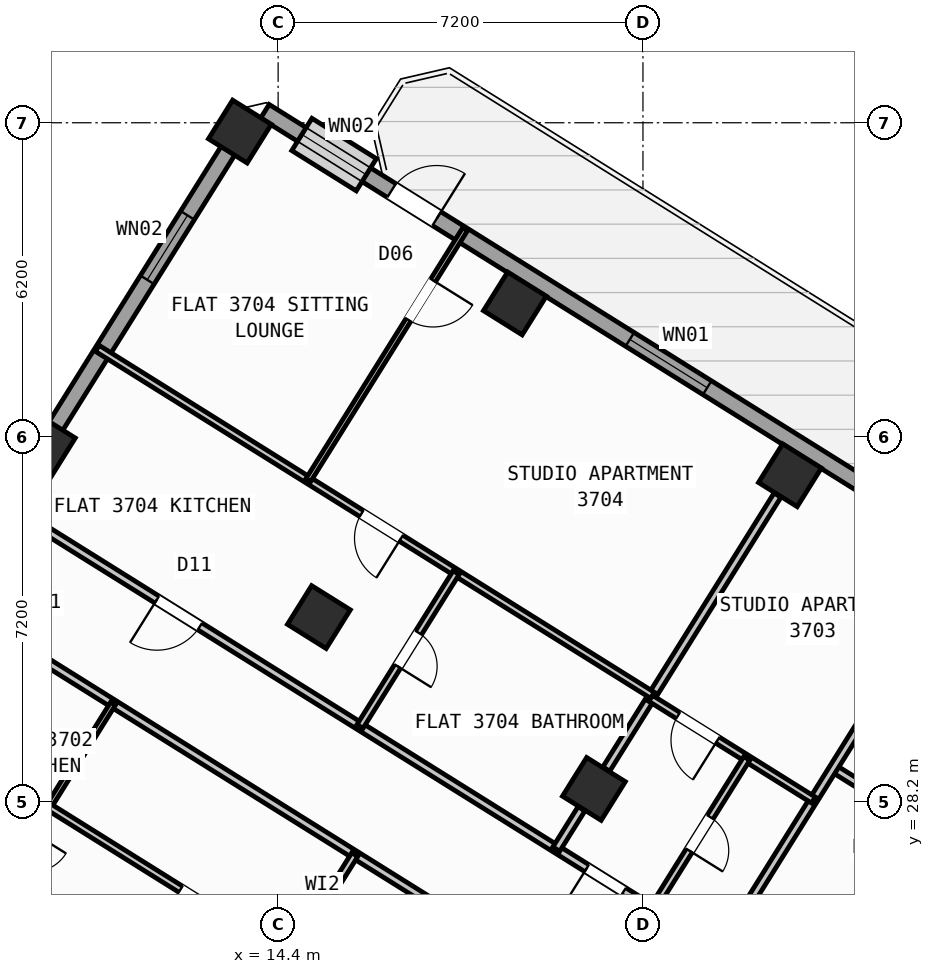
"""IFC4 building model, lengths in metres.
Left out: names, types, materials, properties, quantities, classifications, styles, units other than length and angle.
Written with IfcOpenShell. Run it as: python <this file> out.ifc"""

import sys

from ifc_helpers import new_model, si_unit, direction, frame, frame_2d, origin, origin_2d, place, context, subcontext, project, spatial, rectangle, hollow_rectangle, extrude, source, transform, mapped, element, fill, save


model = new_model("IFC4")
c1 = context("Model", 3, precision=1e-05, world=origin(), true_north=direction((0.0, 1.0)))
c2 = subcontext(c1, "Body", "Model", "MODEL_VIEW")
j1 = project(units=[si_unit("LENGTHUNIT", "METRE"), si_unit("PLANEANGLEUNIT", "RADIAN")], contexts=[c1])
p1 = place(None, origin())
s1 = spatial("IfcSite", under=j1, at=p1, CompositionType="ELEMENT")
p2 = place(p1, origin())
s2 = spatial("IfcBuilding", under=s1, at=p2, CompositionType="ELEMENT")
p3 = place(p2, frame((0.0, 0.0, 147.9)))
s3 = spatial("IfcBuildingStorey", under=s2, at=p3, CompositionType="ELEMENT", Elevation=147.9)
m1 = source(origin(), c2, "Body", "SweptSolid", [
    extrude(hollow_rectangle(XDim=0.9, YDim=0.9, WallThickness=0.036, at=origin_2d()), origin(), (0.0, 0.0, 1.0), 3.6),
])
for number, where, z_axis, x_axis in (
    (1, (24.5, 34.643, 0.0), (0.0, 0.0, 1.0), (-0.848, 0.53, 0.0)),
    (2, (20.632, 28.452, 0.0), (0.0, 0.0, 1.0), (-0.848, 0.53, 0.0)),
    (3, (19.073, 38.034, 0.0), (0.0, 0.0, 1.0), (-0.848, 0.53, 0.0)),
    (4, (15.205, 31.844, 0.0), (0.0, 0.0, 1.0), (-0.848, 0.53, 0.0)),
    (5, (13.646, 41.426, 0.0), (0.0, 0.0, 1.0), (-0.848, 0.53, 0.0)),
    (6, (9.777, 35.235, 0.0), (0.0, 0.0, 1.0), (-0.848, 0.53, 0.0)),
):
    element("IfcColumn", number, at=place(p3, frame(where, z_axis=z_axis, x_axis=x_axis)), inside=s3, PredefinedType="COLUMN", context=c2, shape_type="MappedRepresentation", body=[
        mapped(m1, transform((0.0, 0.0, 0.0), scale=1.0)),
    ])
p4 = place(p3, frame((2.415, 23.452, 0.0), z_axis=(0.0, 0.0, 1.0), x_axis=(0.52991049553, 0.848053575387, 0.0)))
e7 = element("IfcWall", 7, at=p4, inside=s3, PredefinedType="STANDARD", context=c2, shape_type="SweptSolid", body=[
    extrude(rectangle(XDim=21.587, YDim=0.32, at=frame_2d((10.794, 0.0))), origin(), (0.0, 0.0, 1.0), 2.775),
])
p5 = place(p4, frame((2.356, 0.0, 0.8)))
e8 = element("IfcOpeningElement", 8, at=p5, cuts=e7, PredefinedType="OPENING", context=c2, shape_type="SweptSolid", body=[
    extrude(rectangle(XDim=2.1, YDim=1.55, at=frame_2d((1.05, 0.775))), frame((0.0, 0.17, 0.0), z_axis=(0.0, -1.0, 0.0), x_axis=(1.0, 0.0, 0.0)), (0.0, 0.0, 1.0), 0.34),
])
p6 = place(p4, frame((8.639, 0.0, 1.0)))
e9 = element("IfcOpeningElement", 9, at=p6, cuts=e7, PredefinedType="OPENING", context=c2, shape_type="SweptSolid", body=[
    extrude(rectangle(XDim=0.9, YDim=1.25, at=frame_2d((0.45, 0.625))), frame((0.0, 0.17, 0.0), z_axis=(0.0, -1.0, 0.0), x_axis=(1.0, 0.0, 0.0)), (0.0, 0.0, 1.0), 0.34),
])
p7 = place(p4, frame((17.744, 0.0, 0.85)))
e10 = element("IfcOpeningElement", 10, at=p7, cuts=e7, PredefinedType="OPENING", context=c2, shape_type="SweptSolid", body=[
    extrude(rectangle(XDim=1.5, YDim=1.5, at=frame_2d((0.75, 0.75))), frame((0.0, 0.17, 0.0), z_axis=(0.0, -1.0, 0.0), x_axis=(1.0, 0.0, 0.0)), (0.0, 0.0, 1.0), 0.34),
])
p8 = place(p3, frame((14.138, 41.825, 0.0), z_axis=(0.0, 0.0, 1.0), x_axis=(0.848046498049, -0.529921821731, 0.0)))
e11 = element("IfcWall", 11, at=p8, inside=s3, PredefinedType="STANDARD", context=c2, shape_type="SweptSolid", body=[
    extrude(rectangle(XDim=31.588, YDim=0.32, at=frame_2d((15.794, 0.0))), origin(), (0.0, 0.0, 1.0), 3.35),
])
p9 = place(p8, frame((2.949, 0.0, 0.0)))
e12 = element("IfcOpeningElement", 12, at=p9, cuts=e11, PredefinedType="OPENING", context=c2, shape_type="SweptSolid", body=[
    extrude(rectangle(XDim=1.05, YDim=2.15, at=frame_2d((0.525, 1.075))), frame((0.0, 0.17, 0.0), z_axis=(0.0, -1.0, 0.0), x_axis=(1.0, 0.0, 0.0)), (0.0, 0.0, 1.0), 0.34),
])
p10 = place(p8, frame((0.861, 0.0, 0.85)))
e13 = element("IfcOpeningElement", 13, at=p10, cuts=e11, PredefinedType="OPENING", context=c2, shape_type="SweptSolid", body=[
    extrude(rectangle(XDim=1.5, YDim=1.5, at=frame_2d((0.75, 0.75))), frame((0.0, 0.17, 0.0), z_axis=(0.0, -1.0, 0.0), x_axis=(1.0, 0.0, 0.0)), (0.0, 0.0, 1.0), 0.34),
])
p11 = place(p8, frame((8.494, 0.0, 0.85)))
e14 = element("IfcOpeningElement", 14, at=p11, cuts=e11, PredefinedType="OPENING", context=c2, shape_type="SweptSolid", body=[
    extrude(rectangle(XDim=1.8, YDim=1.5, at=frame_2d((0.9, 0.75))), frame((0.0, 0.17, 0.0), z_axis=(0.0, -1.0, 0.0), x_axis=(1.0, 0.0, 0.0)), (0.0, 0.0, 1.0), 0.34),
])
p12 = place(p8, frame((13.874, 0.0, 0.85)))
e15 = element("IfcOpeningElement", 15, at=p12, cuts=e11, PredefinedType="OPENING", context=c2, shape_type="SweptSolid", body=[
    extrude(rectangle(XDim=1.5, YDim=1.5, at=frame_2d((0.75, 0.75))), frame((0.0, 0.17, 0.0), z_axis=(0.0, -1.0, 0.0), x_axis=(1.0, 0.0, 0.0)), (0.0, 0.0, 1.0), 0.34),
])
p13 = place(p8, frame((17.104, 0.0, 1.0)))
e16 = element("IfcOpeningElement", 16, at=p13, cuts=e11, PredefinedType="OPENING", context=c2, shape_type="SweptSolid", body=[
    extrude(rectangle(XDim=0.9, YDim=1.25, at=frame_2d((0.45, 0.625))), frame((0.0, 0.17, 0.0), z_axis=(0.0, -1.0, 0.0), x_axis=(1.0, 0.0, 0.0)), (0.0, 0.0, 1.0), 0.34),
])
p14 = place(p8, frame((22.144, 0.0, 1.0)))
e17 = element("IfcOpeningElement", 17, at=p14, cuts=e11, PredefinedType="OPENING", context=c2, shape_type="SweptSolid", body=[
    extrude(rectangle(XDim=0.9, YDim=1.25, at=frame_2d((0.45, 0.625))), frame((0.0, 0.17, 0.0), z_axis=(0.0, -1.0, 0.0), x_axis=(1.0, 0.0, 0.0)), (0.0, 0.0, 1.0), 0.34),
])
p15 = place(p8, frame((27.744, 0.0, 1.0)))
e18 = element("IfcOpeningElement", 18, at=p15, cuts=e11, PredefinedType="OPENING", context=c2, shape_type="SweptSolid", body=[
    extrude(rectangle(XDim=0.9, YDim=1.25, at=frame_2d((0.45, 0.625))), frame((0.0, 0.17, 0.0), z_axis=(0.0, -1.0, 0.0), x_axis=(1.0, 0.0, 0.0)), (0.0, 0.0, 1.0), 0.34),
])
p16 = place(p3, frame((27.57, 27.478, 0.0), z_axis=(0.0, 0.0, 1.0), x_axis=(-0.848050851465, 0.529914854792, 0.0)))
e19 = element("IfcWall", 19, at=p16, inside=s3, PredefinedType="PARTITIONING", context=c2, shape_type="SweptSolid", body=[
    extrude(rectangle(XDim=2.61, YDim=0.16, at=frame_2d((1.305, 0.0))), origin(), (0.0, 0.0, 1.0), 3.34),
])
p17 = place(p16, frame((0.95, 0.0, 0.0)))
e20 = element("IfcOpeningElement", 20, at=p17, cuts=e19, PredefinedType="OPENING", context=c2, shape_type="SweptSolid", body=[
    extrude(rectangle(XDim=0.86, YDim=2.05, at=frame_2d((0.43, 1.025))), frame((0.0, 0.09, 0.0), z_axis=(0.0, -1.0, 0.0), x_axis=(1.0, 0.0, 0.0)), (0.0, 0.0, 1.0), 0.18),
])
p18 = place(p3, frame((27.953, 33.016, 0.0), z_axis=(0.0, 0.0, 1.0), x_axis=(-0.529903001606, -0.848058257957, 0.0)))
e21 = element("IfcWall", 21, at=p18, inside=s3, PredefinedType="PARTITIONING", context=c2, shape_type="SweptSolid", body=[
    extrude(rectangle(XDim=9.15, YDim=0.16, at=frame_2d((4.575, 0.0))), origin(), (0.0, 0.0, 1.0), 3.34),
])
p19 = place(p3, frame((23.104, 25.256, 0.0), z_axis=(0.0, 0.0, 1.0), x_axis=(-0.848041752158, 0.529929416617, 0.0)))
e22 = element("IfcWall", 22, at=p19, inside=s3, PredefinedType="PARTITIONING", context=c2, shape_type="SweptSolid", body=[
    extrude(rectangle(XDim=16.73, YDim=0.16, at=frame_2d((8.365, 0.0))), origin(), (0.0, 0.0, 1.0), 3.34),
])
p20 = place(p19, frame((2.22, 0.0, 0.0)))
e23 = element("IfcOpeningElement", 23, at=p20, cuts=e22, PredefinedType="OPENING", context=c2, shape_type="SweptSolid", body=[
    extrude(rectangle(XDim=0.86, YDim=2.05, at=frame_2d((0.43, 1.025))), frame((0.0, 0.09, 0.0), z_axis=(0.0, -1.0, 0.0), x_axis=(1.0, 0.0, 0.0)), (0.0, 0.0, 1.0), 0.18),
])
p21 = place(p19, frame((12.084, 0.0, 0.0)))
e24 = element("IfcOpeningElement", 24, at=p21, cuts=e22, PredefinedType="OPENING", context=c2, shape_type="SweptSolid", body=[
    extrude(rectangle(XDim=1.0, YDim=2.1, at=frame_2d((0.5, 1.05))), frame((0.0, 0.09, 0.0), z_axis=(0.0, -1.0, 0.0), x_axis=(1.0, 0.0, 0.0)), (0.0, 0.0, 1.0), 0.18),
])
p22 = place(p3, frame((21.938, 23.391, 0.0), z_axis=(0.0, 0.0, 1.0), x_axis=(-0.848045850158, 0.529922858565, 0.0)))
e25 = element("IfcWall", 25, at=p22, inside=s3, PredefinedType="PARTITIONING", context=c2, shape_type="SweptSolid", body=[
    extrude(rectangle(XDim=16.73, YDim=0.16, at=frame_2d((8.365, 0.0))), origin(), (0.0, 0.0, 1.0), 3.34),
])
p23 = place(p22, frame((2.22, 0.0, 0.0)))
e26 = element("IfcOpeningElement", 26, at=p23, cuts=e25, PredefinedType="OPENING", context=c2, shape_type="SweptSolid", body=[
    extrude(rectangle(XDim=0.86, YDim=2.05, at=frame_2d((0.43, 1.025))), frame((0.0, 0.09, 0.0), z_axis=(0.0, -1.0, 0.0), x_axis=(1.0, 0.0, 0.0)), (0.0, 0.0, 1.0), 0.18),
])
p24 = place(p22, frame((14.22, 0.0, 0.0)))
e27 = element("IfcOpeningElement", 27, at=p24, cuts=e25, PredefinedType="OPENING", context=c2, shape_type="SweptSolid", body=[
    extrude(rectangle(XDim=1.0, YDim=2.1, at=frame_2d((0.5, 1.05))), frame((0.0, 0.09, 0.0), z_axis=(0.0, -1.0, 0.0), x_axis=(1.0, 0.0, 0.0)), (0.0, 0.0, 1.0), 0.18),
])
p25 = place(p3, frame((11.143, 30.136, 0.0), z_axis=(0.0, 0.0, 1.0), x_axis=(-0.529922479612, -0.848046086956, 0.0)))
e28 = element("IfcWall", 28, at=p25, inside=s3, PredefinedType="PARTITIONING", context=c2, shape_type="SweptSolid", body=[
    extrude(rectangle(XDim=10.62, YDim=0.11, at=frame_2d((5.31, 0.0))), origin(), (0.0, 0.0, 1.0), 3.34),
])
p26 = place(p25, frame((3.0, 0.0, 0.0)))
e29 = element("IfcOpeningElement", 29, at=p26, cuts=e28, PredefinedType="OPENING", context=c2, shape_type="SweptSolid", body=[
    extrude(rectangle(XDim=0.78, YDim=2.05, at=frame_2d((0.39, 1.025))), frame((0.0, 0.065, 0.0), z_axis=(0.0, -1.0, 0.0), x_axis=(1.0, 0.0, 0.0)), (0.0, 0.0, 1.0), 0.13),
])
p27 = place(p3, frame((17.452, 23.364, 0.0), z_axis=(0.0, 0.0, 1.0), x_axis=(-0.848044326704, 0.52992529657, 0.0)))
e30 = element("IfcWall", 30, at=p27, inside=s3, PredefinedType="PLUMBINGWALL", context=c2, shape_type="SweptSolid", body=[
    extrude(rectangle(XDim=8.94, YDim=0.14, at=frame_2d((4.47, 0.0))), origin(), (0.0, 0.0, 1.0), 3.34),
])
p28 = place(p27, frame((5.087, 0.0, 0.0)))
e31 = element("IfcOpeningElement", 31, at=p28, cuts=e30, PredefinedType="OPENING", context=c2, shape_type="SweptSolid", body=[
    extrude(rectangle(XDim=0.78, YDim=2.05, at=frame_2d((0.39, 1.025))), frame((0.0, 0.08, 0.0), z_axis=(0.0, -1.0, 0.0), x_axis=(1.0, 0.0, 0.0)), (0.0, 0.0, 1.0), 0.16),
])
p29 = place(p27, frame((1.218, 0.0, 0.0)))
e32 = element("IfcOpeningElement", 32, at=p29, cuts=e30, PredefinedType="OPENING", context=c2, shape_type="SweptSolid", body=[
    extrude(rectangle(XDim=0.78, YDim=2.05, at=frame_2d((0.39, 1.025))), frame((0.0, 0.08, 0.0), z_axis=(0.0, -1.0, 0.0), x_axis=(1.0, 0.0, 0.0)), (0.0, 0.0, 1.0), 0.16),
])
p30 = place(p3, frame((15.913, 27.156, 0.0), z_axis=(0.0, 0.0, 1.0), x_axis=(-0.529935194983, -0.848038141311, 0.0)))
e33 = element("IfcWall", 33, at=p30, inside=s3, PredefinedType="PLUMBINGWALL", context=c2, shape_type="SweptSolid", body=[
    extrude(rectangle(XDim=2.41, YDim=0.14, at=frame_2d((1.205, 0.0))), origin(), (0.0, 0.0, 1.0), 3.34),
])
p31 = place(p3, frame((16.403, 21.685, 0.0), z_axis=(0.0, 0.0, 1.0), x_axis=(-0.848044326704, 0.52992529657, 0.0)))
e34 = element("IfcWall", 34, at=p31, inside=s3, PredefinedType="PARTITIONING", context=c2, shape_type="SweptSolid", body=[
    extrude(rectangle(XDim=8.94, YDim=0.11, at=frame_2d((4.47, 0.0))), origin(), (0.0, 0.0, 1.0), 3.34),
])
p32 = place(p31, frame((0.657, 0.0, 0.0)))
e35 = element("IfcOpeningElement", 35, at=p32, cuts=e34, PredefinedType="OPENING", context=c2, shape_type="SweptSolid", body=[
    extrude(rectangle(XDim=0.92, YDim=2.08, at=frame_2d((0.46, 1.04))), frame((0.0, 0.065, 0.0), z_axis=(0.0, -1.0, 0.0), x_axis=(1.0, 0.0, 0.0)), (0.0, 0.0, 1.0), 0.13),
])
p33 = place(p31, frame((2.893, 0.0, 0.0)))
e36 = element("IfcOpeningElement", 36, at=p33, cuts=e34, PredefinedType="OPENING", context=c2, shape_type="SweptSolid", body=[
    extrude(rectangle(XDim=0.92, YDim=2.08, at=frame_2d((0.46, 1.04))), frame((0.0, 0.065, 0.0), z_axis=(0.0, -1.0, 0.0), x_axis=(1.0, 0.0, 0.0)), (0.0, 0.0, 1.0), 0.13),
])
p34 = place(p31, frame((5.008, 0.0, 0.0)))
e37 = element("IfcOpeningElement", 37, at=p34, cuts=e34, PredefinedType="OPENING", context=c2, shape_type="SweptSolid", body=[
    extrude(rectangle(XDim=0.92, YDim=2.08, at=frame_2d((0.46, 1.04))), frame((0.0, 0.065, 0.0), z_axis=(0.0, -1.0, 0.0), x_axis=(1.0, 0.0, 0.0)), (0.0, 0.0, 1.0), 0.13),
])
p35 = place(p31, frame((7.363, 0.0, 0.0)))
e38 = element("IfcOpeningElement", 38, at=p35, cuts=e34, PredefinedType="OPENING", context=c2, shape_type="SweptSolid", body=[
    extrude(rectangle(XDim=0.92, YDim=2.08, at=frame_2d((0.46, 1.04))), frame((0.0, 0.065, 0.0), z_axis=(0.0, -1.0, 0.0), x_axis=(1.0, 0.0, 0.0)), (0.0, 0.0, 1.0), 0.13),
])
p36 = place(p3, frame((24.256, 34.251, 0.0), z_axis=(0.0, 0.0, 1.0), x_axis=(-0.529919772691, -0.848047778437, 0.0)))
e39 = element("IfcWall", 39, at=p36, inside=s3, PredefinedType="PARTITIONING", context=c2, shape_type="SweptSolid", body=[
    extrude(rectangle(XDim=6.376, YDim=0.16, at=frame_2d((3.188, 0.0))), origin(), (0.0, 0.0, 1.0), 2.775),
])
p37 = place(p3, frame((20.387, 28.06, 0.0), z_axis=(0.0, 0.0, 1.0), x_axis=(-0.529952145338, -0.848027548876, 0.0)))
e40 = element("IfcWall", 40, at=p37, inside=s3, PredefinedType="PARTITIONING", context=c2, shape_type="SweptSolid", body=[
    extrude(rectangle(XDim=0.938, YDim=0.16, at=frame_2d((0.469, 0.0))), origin(), (0.0, 0.0, 1.0), 2.775),
])
p38 = place(p3, frame((24.964, 28.233, 0.0), z_axis=(0.0, 0.0, 1.0), x_axis=(-0.848059820872, 0.529900500304, 0.0)))
e41 = element("IfcWall", 41, at=p38, inside=s3, PredefinedType="PLUMBINGWALL", context=c2, shape_type="SweptSolid", body=[
    extrude(rectangle(XDim=3.79, YDim=0.14, at=frame_2d((1.895, 0.0))), origin(), (0.0, 0.0, 1.0), 3.34),
])
p39 = place(p38, frame((2.23, 0.0, 0.0)))
e42 = element("IfcOpeningElement", 42, at=p39, cuts=e41, PredefinedType="OPENING", context=c2, shape_type="SweptSolid", body=[
    extrude(rectangle(XDim=0.92, YDim=2.08, at=frame_2d((0.46, 1.04))), frame((0.0, 0.08, 0.0), z_axis=(0.0, -1.0, 0.0), x_axis=(1.0, 0.0, 0.0)), (0.0, 0.0, 1.0), 0.16),
])
p40 = place(p3, frame((23.65, 29.054, 0.0), z_axis=(0.0, 0.0, 1.0), x_axis=(-0.529898896701, -0.848060822863, 0.0)))
e43 = element("IfcWall", 43, at=p40, inside=s3, PredefinedType="PLUMBINGWALL", context=c2, shape_type="SweptSolid", body=[
    extrude(rectangle(XDim=3.51, YDim=0.14, at=frame_2d((1.755, 0.0))), origin(), (0.0, 0.0, 1.0), 2.995),
])
p41 = place(p40, frame((1.365, 0.0, 0.0)))
e44 = element("IfcOpeningElement", 44, at=p41, cuts=e43, PredefinedType="OPENING", context=c2, shape_type="SweptSolid", body=[
    extrude(rectangle(XDim=0.78, YDim=2.05, at=frame_2d((0.39, 1.025))), frame((0.0, 0.08, 0.0), z_axis=(0.0, -1.0, 0.0), x_axis=(1.0, 0.0, 0.0)), (0.0, 0.0, 1.0), 0.16),
])
p42 = place(p3, frame((21.787, 30.301, 0.0), z_axis=(0.0, 0.0, 1.0), x_axis=(-0.848043949058, 0.52992590092, 0.0)))
e45 = element("IfcWall", 45, at=p42, inside=s3, PredefinedType="PLUMBINGWALL", context=c2, shape_type="SweptSolid", body=[
    extrude(rectangle(XDim=12.92, YDim=0.14, at=frame_2d((6.46, 0.0))), origin(), (0.0, 0.0, 1.0), 3.34),
])
p43 = place(p42, frame((5.849, 0.0, 0.0)))
e46 = element("IfcOpeningElement", 46, at=p43, cuts=e45, PredefinedType="OPENING", context=c2, shape_type="SweptSolid", body=[
    extrude(rectangle(XDim=0.92, YDim=2.08, at=frame_2d((0.46, 1.04))), frame((0.0, 0.08, 0.0), z_axis=(0.0, -1.0, 0.0), x_axis=(1.0, 0.0, 0.0)), (0.0, 0.0, 1.0), 0.16),
])
p44 = place(p3, frame((17.913, 32.721, 0.0), z_axis=(0.0, 0.0, 1.0), x_axis=(-0.529906983049, -0.848055770169, 0.0)))
e47 = element("IfcWall", 47, at=p44, inside=s3, PredefinedType="PLUMBINGWALL", context=c2, shape_type="SweptSolid", body=[
    extrude(rectangle(XDim=3.58, YDim=0.14, at=frame_2d((1.79, 0.0))), origin(), (0.0, 0.0, 1.0), 3.34),
])
p45 = place(p44, frame((1.4, 0.0, 0.0)))
e48 = element("IfcOpeningElement", 48, at=p45, cuts=e47, PredefinedType="OPENING", context=c2, shape_type="SweptSolid", body=[
    extrude(rectangle(XDim=0.78, YDim=2.05, at=frame_2d((0.39, 1.025))), frame((0.0, 0.08, 0.0), z_axis=(0.0, -1.0, 0.0), x_axis=(1.0, 0.0, 0.0)), (0.0, 0.0, 1.0), 0.16),
])
p46 = place(p3, frame((18.089, 39.498, 0.0), z_axis=(0.0, 0.0, 1.0), x_axis=(-0.529916267533, -0.848049968695, 0.0)))
e49 = element("IfcWall", 49, at=p46, inside=s3, PredefinedType="PARTITIONING", context=c2, shape_type="SweptSolid", body=[
    extrude(rectangle(XDim=5.84, YDim=0.11, at=frame_2d((2.92, 0.0))), origin(), (0.0, 0.0, 1.0), 3.34),
])
p47 = place(p46, frame((1.19, 0.0, 0.0)))
e50 = element("IfcOpeningElement", 50, at=p47, cuts=e49, PredefinedType="OPENING", context=c2, shape_type="SweptSolid", body=[
    extrude(rectangle(XDim=0.92, YDim=2.08, at=frame_2d((0.46, 1.04))), frame((0.0, 0.065, 0.0), z_axis=(0.0, -1.0, 0.0), x_axis=(1.0, 0.0, 0.0)), (0.0, 0.0, 1.0), 0.13),
])
m2 = source(origin(), c2, "Body", "SweptSolid", [
    extrude(rectangle(XDim=1.05, YDim=2.15, at=frame_2d((0.525, 1.075))), frame((0.0, 0.025, 0.0), z_axis=(0.0, -1.0, 0.0), x_axis=(1.0, 0.0, 0.0)), (0.0, 0.0, 1.0), 0.05),
])
p48 = place(p9, origin())
e51 = element("IfcDoor", 51, at=p48, inside=s3, OperationType="SINGLE_SWING_RIGHT", PredefinedType="DOOR", context=c2, shape_type="MappedRepresentation", body=[
    mapped(m2, transform((0.0, 0.0, 0.0), scale=1.0)),
])
fill(e12, e51)
m3 = source(origin(), c2, "Body", "SweptSolid", [
    extrude(rectangle(XDim=1.5, YDim=1.5, at=frame_2d((0.75, 0.75))), frame((0.0, 0.03, 0.0), z_axis=(0.0, -1.0, 0.0), x_axis=(1.0, 0.0, 0.0)), (0.0, 0.0, 1.0), 0.06),
])
p49 = place(p7, origin())
e52 = element("IfcWindow", 52, at=p49, inside=s3, PartitioningType="SINGLE_PANEL", PredefinedType="WINDOW", context=c2, shape_type="MappedRepresentation", body=[
    mapped(m3, transform((0.0, 0.0, 0.0), scale=1.0)),
])
fill(e10, e52)
p50 = place(p10, origin())
e53 = element("IfcWindow", 53, at=p50, inside=s3, PartitioningType="SINGLE_PANEL", PredefinedType="WINDOW", context=c2, shape_type="MappedRepresentation", body=[
    mapped(m3, transform((0.0, 0.0, 0.0), scale=1.0)),
])
fill(e13, e53)
m4 = source(origin(), c2, "Body", "SweptSolid", [
    extrude(rectangle(XDim=1.8, YDim=1.5, at=frame_2d((0.9, 0.75))), frame((0.0, 0.03, 0.0), z_axis=(0.0, -1.0, 0.0), x_axis=(1.0, 0.0, 0.0)), (0.0, 0.0, 1.0), 0.06),
])
p51 = place(p11, origin())
e54 = element("IfcWindow", 54, at=p51, inside=s3, PartitioningType="SINGLE_PANEL", PredefinedType="WINDOW", context=c2, shape_type="MappedRepresentation", body=[
    mapped(m4, transform((0.0, 0.0, 0.0), scale=1.0)),
])
fill(e14, e54)
m5 = source(origin(), c2, "Body", "SweptSolid", [
    extrude(rectangle(XDim=0.78, YDim=2.05, at=frame_2d((0.39, 1.025))), frame((0.0, 0.025, 0.0), z_axis=(0.0, -1.0, 0.0), x_axis=(1.0, 0.0, 0.0)), (0.0, 0.0, 1.0), 0.05),
])
p52 = place(p28, origin())
e55 = element("IfcDoor", 55, at=p52, inside=s3, OperationType="SINGLE_SWING_LEFT", PredefinedType="DOOR", context=c2, shape_type="MappedRepresentation", body=[
    mapped(m5, transform((0.0, 0.0, 0.0), scale=1.0)),
])
fill(e31, e55)
m6 = source(origin(), c2, "Body", "SweptSolid", [
    extrude(rectangle(XDim=0.86, YDim=2.05, at=frame_2d((0.43, 1.025))), frame((0.0, 0.025, 0.0), z_axis=(0.0, -1.0, 0.0), x_axis=(1.0, 0.0, 0.0)), (0.0, 0.0, 1.0), 0.05),
])
p53 = place(p20, origin())
e56 = element("IfcDoor", 56, at=p53, inside=s3, OperationType="SINGLE_SWING_RIGHT", PredefinedType="DOOR", context=c2, shape_type="MappedRepresentation", body=[
    mapped(m6, transform((0.0, 0.0, 0.0), scale=1.0)),
])
fill(e23, e56)
m7 = source(origin(), c2, "Body", "SweptSolid", [
    extrude(rectangle(XDim=0.92, YDim=2.08, at=frame_2d((0.46, 1.04))), frame((0.0, 0.025, 0.0), z_axis=(0.0, -1.0, 0.0), x_axis=(1.0, 0.0, 0.0)), (0.0, 0.0, 1.0), 0.05),
])
p54 = place(p39, origin())
e57 = element("IfcDoor", 57, at=p54, inside=s3, OperationType="SINGLE_SWING_LEFT", PredefinedType="DOOR", context=c2, shape_type="MappedRepresentation", body=[
    mapped(m7, transform((0.0, 0.0, 0.0), scale=1.0)),
])
fill(e42, e57)
p55 = place(p41, origin())
e58 = element("IfcDoor", 58, at=p55, inside=s3, OperationType="SINGLE_SWING_RIGHT", PredefinedType="DOOR", context=c2, shape_type="MappedRepresentation", body=[
    mapped(m5, transform((0.0, 0.0, 0.0), scale=1.0)),
])
fill(e44, e58)
p56 = place(p47, origin())
e59 = element("IfcDoor", 59, at=p56, inside=s3, OperationType="SINGLE_SWING_LEFT", PredefinedType="DOOR", context=c2, shape_type="MappedRepresentation", body=[
    mapped(m7, transform((0.0, 0.0, 0.0), scale=1.0)),
])
fill(e50, e59)
m8 = source(origin(), c2, "Body", "SweptSolid", [
    extrude(rectangle(XDim=1.0, YDim=2.1, at=frame_2d((0.5, 1.05))), frame((0.0, 0.025, 0.0), z_axis=(0.0, -1.0, 0.0), x_axis=(1.0, 0.0, 0.0)), (0.0, 0.0, 1.0), 0.05),
])
p57 = place(p21, origin())
e60 = element("IfcDoor", 60, at=p57, inside=s3, OperationType="SINGLE_SWING_RIGHT", PredefinedType="DOOR", context=c2, shape_type="MappedRepresentation", body=[
    mapped(m8, transform((0.0, 0.0, 0.0), scale=1.0)),
])
fill(e24, e60)
p58 = place(p43, origin())
e61 = element("IfcDoor", 61, at=p58, inside=s3, OperationType="SINGLE_SWING_LEFT", PredefinedType="DOOR", context=c2, shape_type="MappedRepresentation", body=[
    mapped(m7, transform((0.0, 0.0, 0.0), scale=1.0)),
])
fill(e46, e61)
p59 = place(p45, origin())
e62 = element("IfcDoor", 62, at=p59, inside=s3, OperationType="SINGLE_SWING_RIGHT", PredefinedType="DOOR", context=c2, shape_type="MappedRepresentation", body=[
    mapped(m5, transform((0.0, 0.0, 0.0), scale=1.0)),
])
fill(e48, e62)
save(model, sys.argv[1])
